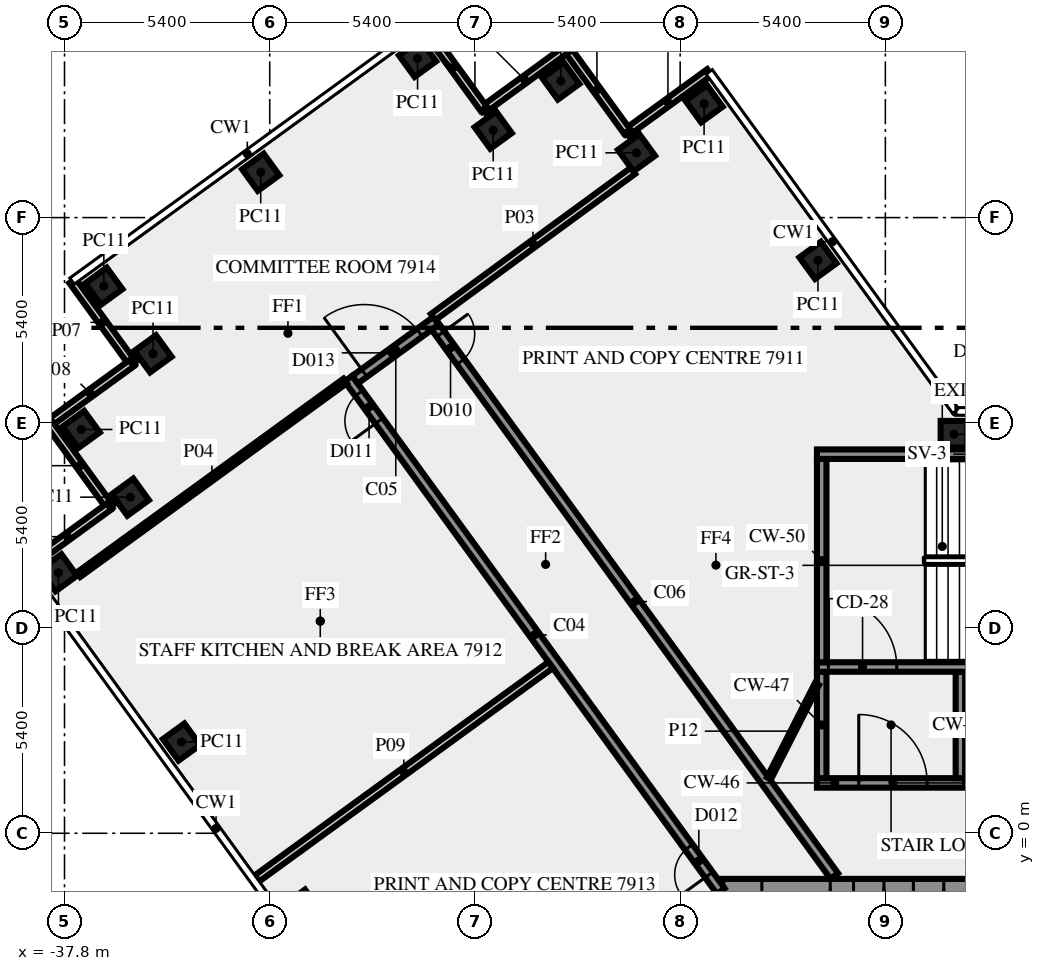
"""IFC4 building model, lengths in metres.
Left out: names, types, materials, properties, quantities, classifications, styles, units other than length and angle.
Written with IfcOpenShell. Run it as: python <this file> out.ifc"""

import sys

from ifc_helpers import new_model, si_unit, direction, frame, frame_2d, origin, origin_2d, place, context, subcontext, project, spatial, rectangle, extrude, element, fill, save


model = new_model("IFC4")
c1 = context("Model", 3, precision=1e-05, world=origin(), true_north=direction((0.0, 1.0)))
c2 = subcontext(c1, "Body", "Model", "MODEL_VIEW")
j1 = project(units=[si_unit("LENGTHUNIT", "METRE"), si_unit("PLANEANGLEUNIT", "RADIAN")], contexts=[c1])
p1 = place(None, origin())
s1 = spatial("IfcSite", under=j1, at=p1, CompositionType="ELEMENT")
p2 = place(p1, origin())
s2 = spatial("IfcBuilding", under=s1, at=p2, CompositionType="ELEMENT")
p3 = place(p2, frame((0.0, 0.0, 339.0)))
s3 = spatial("IfcBuildingStorey", under=s2, at=p3, CompositionType="ELEMENT", Elevation=339.0)
for number, where, z_axis, x_axis in (
    (1, (-17.974, 15.075, 0.0), (0.0, 0.0, 1.0), (-0.588, 0.809, 0.0)),
    (2, (-20.97, 19.195, 0.0), (0.0, 0.0, 1.0), (-0.588, 0.809, 0.0)),
    (3, (-22.749, 17.904, 0.0), (0.0, 0.0, 1.0), (-0.588, 0.809, 0.0)),
    (4, (-24.74, 19.795, 0.0), (0.0, 0.0, 1.0), (-0.588, 0.809, 0.0)),
    (5, (-26.519, 18.5, 0.0), (0.0, 0.0, 1.0), (-0.588, 0.809, 0.0)),
    (6, (-28.51, 20.39, 0.0), (0.0, 0.0, 1.0), (-0.809, -0.588, 0.0)),
    (7, (-32.637, 17.393, 0.0), (0.0, 0.0, 1.0), (-0.809, -0.588, 0.0)),
    (8, (-36.765, 14.395, 0.0), (0.0, 0.0, 1.0), (0.588, -0.809, 0.0)),
    (9, (-35.471, 12.616, 0.0), (0.0, 0.0, 1.0), (-0.809, -0.588, 0.0)),
    (10, (-37.36, 10.625, 0.0), (0.0, 0.0, 1.0), (0.588, -0.809, 0.0)),
    (11, (-36.068, 8.844, 0.0), (0.0, 0.0, 1.0), (0.588, -0.809, 0.0)),
    (12, (-37.96, 6.855, 0.0), (0.0, 0.0, 1.0), (0.588, -0.809, 0.0)),
    (13, (-34.722, 2.4, 0.0), (0.0, 0.0, 1.0), (0.588, -0.809, 0.0)),
    (14, (-31.548, -1.969, 0.0), (0.0, 0.0, 1.0), (0.588, -0.809, 0.0)),
    (15, (-14.395, 10.5, 0.0), (0.0, 0.0, 1.0), (-1.0, 0.0, 0.0)),
):
    element("IfcColumn", number, at=place(p3, frame(where, z_axis=z_axis, x_axis=x_axis)), inside=s3, PredefinedType="COLUMN", context=c2, shape_type="SweptSolid", body=[
        extrude(rectangle(XDim=0.7, YDim=0.7, at=origin_2d()), origin(), (0.0, 0.0, 1.0), 3.65),
    ])
for number, where, z_axis, x_axis in (
    (16, (-20.829, 20.025, 0.0), (0.0, 0.0, 1.0), (-0.809, -0.588, 0.0)),
    (17, (-22.996, 18.466, 0.0), (0.0, 0.0, 1.0), (-0.588, 0.809, 0.0)),
):
    element("IfcWall", number, at=place(p3, frame(where, z_axis=z_axis, x_axis=x_axis)), inside=s3, PredefinedType="SOLIDWALL", context=c2, shape_type="SweptSolid", body=[
        extrude(rectangle(XDim=2.7, YDim=0.2, at=frame_2d((1.35, 0.0))), origin(), (0.0, 0.0, 1.0), 3.65),
    ])
for number, where, z_axis, x_axis in (
    (18, (-24.6, 20.623, 0.0), (0.0, 0.0, 1.0), (-0.809, -0.588, 0.0)),
    (19, (-26.768, 19.063, 0.0), (0.0, 0.0, 1.0), (-0.588, 0.809, 0.0)),
):
    element("IfcWall", number, at=place(p3, frame(where, z_axis=z_axis, x_axis=x_axis)), inside=s3, PredefinedType="SOLIDWALL", context=c2, shape_type="SweptSolid", body=[
        extrude(rectangle(XDim=2.7, YDim=0.2, at=frame_2d((1.35, 0.0))), origin(), (0.0, 0.0, 1.0), 3.65),
    ])
for number, where, z_axis, x_axis in (
    (20, (-37.592, 14.536, 0.0), (0.0, 0.0, 1.0), (0.588, -0.809, 0.0)),
    (21, (-36.032, 12.369, 0.0), (0.0, 0.0, 1.0), (-0.809, -0.588, 0.0)),
    (22, (-38.189, 10.765, 0.0), (0.0, 0.0, 1.0), (0.588, -0.809, 0.0)),
    (23, (-36.629, 8.597, 0.0), (0.0, 0.0, 1.0), (-0.809, -0.588, 0.0)),
):
    element("IfcWall", number, at=place(p3, frame(where, z_axis=z_axis, x_axis=x_axis)), inside=s3, PredefinedType="SOLIDWALL", context=c2, shape_type="SweptSolid", body=[
        extrude(rectangle(XDim=2.7, YDim=0.2, at=frame_2d((1.35, 0.0))), origin(), (0.0, 0.0, 1.0), 3.65),
    ])
p4 = place(p3, frame((20.49, -1.45, 0.0), z_axis=(0.0, 0.0, 1.0), x_axis=(-1.0, 0.0, 0.0)))
e24 = element("IfcWall", 24, at=p4, inside=s3, PredefinedType="SHEAR", context=c2, shape_type="SweptSolid", body=[
    extrude(rectangle(XDim=40.98, YDim=0.5, at=frame_2d((20.49, 0.0))), origin(), (0.0, 0.0, 1.0), 3.65),
])
p5 = place(p4, frame((38.14, 0.0, 0.0)))
e25 = element("IfcOpeningElement", 25, at=p5, cuts=e24, PredefinedType="OPENING", context=c2, shape_type="SweptSolid", body=[
    extrude(rectangle(XDim=1.8, YDim=2.1, at=frame_2d((0.9, 1.05))), frame((0.0, 0.26, 0.0), z_axis=(0.0, -1.0, 0.0), x_axis=(1.0, 0.0, 0.0)), (0.0, 0.0, 1.0), 0.52),
])
p6 = place(p4, frame((36.728, 0.0, 0.0)))
e26 = element("IfcOpeningElement", 26, at=p6, cuts=e24, PredefinedType="OPENING", context=c2, shape_type="SweptSolid", body=[
    extrude(rectangle(XDim=0.8, YDim=2.1, at=frame_2d((0.4, 1.05))), frame((0.0, 0.26, 0.0), z_axis=(0.0, -1.0, 0.0), x_axis=(1.0, 0.0, 0.0)), (0.0, 0.0, 1.0), 0.52),
])
p7 = place(p4, frame((35.153, 0.0, 0.0)))
e27 = element("IfcOpeningElement", 27, at=p7, cuts=e24, PredefinedType="OPENING", context=c2, shape_type="SweptSolid", body=[
    extrude(rectangle(XDim=0.8, YDim=2.1, at=frame_2d((0.4, 1.05))), frame((0.0, 0.26, 0.0), z_axis=(0.0, -1.0, 0.0), x_axis=(1.0, 0.0, 0.0)), (0.0, 0.0, 1.0), 0.52),
])
p8 = place(p4, frame((32.94, 0.0, 0.0)))
e28 = element("IfcOpeningElement", 28, at=p8, cuts=e24, PredefinedType="OPENING", context=c2, shape_type="SweptSolid", body=[
    extrude(rectangle(XDim=0.9, YDim=2.1, at=frame_2d((0.45, 1.05))), frame((0.0, 0.26, 0.0), z_axis=(0.0, -1.0, 0.0), x_axis=(1.0, 0.0, 0.0)), (0.0, 0.0, 1.0), 0.52),
])
p9 = place(p4, frame((31.015, 0.0, 0.0)))
e29 = element("IfcOpeningElement", 29, at=p9, cuts=e24, PredefinedType="OPENING", context=c2, shape_type="SweptSolid", body=[
    extrude(rectangle(XDim=0.8, YDim=2.1, at=frame_2d((0.4, 1.05))), frame((0.0, 0.26, 0.0), z_axis=(0.0, -1.0, 0.0), x_axis=(1.0, 0.0, 0.0)), (0.0, 0.0, 1.0), 0.52),
])
p10 = place(p4, frame((24.765, 0.0, 0.0)))
e30 = element("IfcOpeningElement", 30, at=p10, cuts=e24, PredefinedType="OPENING", context=c2, shape_type="SweptSolid", body=[
    extrude(rectangle(XDim=0.8, YDim=2.1, at=frame_2d((0.4, 1.05))), frame((0.0, 0.26, 0.0), z_axis=(0.0, -1.0, 0.0), x_axis=(1.0, 0.0, 0.0)), (0.0, 0.0, 1.0), 0.52),
])
p11 = place(p4, frame((19.59, 0.0, 0.0)))
e31 = element("IfcOpeningElement", 31, at=p11, cuts=e24, PredefinedType="OPENING", context=c2, shape_type="SweptSolid", body=[
    extrude(rectangle(XDim=2.0, YDim=2.1, at=frame_2d((1.0, 1.05))), frame((0.0, 0.26, 0.0), z_axis=(0.0, -1.0, 0.0), x_axis=(1.0, 0.0, 0.0)), (0.0, 0.0, 1.0), 0.52),
])
p12 = place(p4, frame((15.103, 0.0, 0.0)))
e32 = element("IfcOpeningElement", 32, at=p12, cuts=e24, PredefinedType="OPENING", context=c2, shape_type="SweptSolid", body=[
    extrude(rectangle(XDim=0.9, YDim=2.1, at=frame_2d((0.45, 1.05))), frame((0.0, 0.26, 0.0), z_axis=(0.0, -1.0, 0.0), x_axis=(1.0, 0.0, 0.0)), (0.0, 0.0, 1.0), 0.52),
])
p13 = place(p4, frame((13.04, 0.0, 0.0)))
e33 = element("IfcOpeningElement", 33, at=p13, cuts=e24, PredefinedType="OPENING", context=c2, shape_type="SweptSolid", body=[
    extrude(rectangle(XDim=0.9, YDim=2.1, at=frame_2d((0.45, 1.05))), frame((0.0, 0.26, 0.0), z_axis=(0.0, -1.0, 0.0), x_axis=(1.0, 0.0, 0.0)), (0.0, 0.0, 1.0), 0.52),
])
p14 = place(p4, frame((10.177, 0.0, 0.0)))
e34 = element("IfcOpeningElement", 34, at=p14, cuts=e24, PredefinedType="OPENING", context=c2, shape_type="SweptSolid", body=[
    extrude(rectangle(XDim=0.9, YDim=2.1, at=frame_2d((0.45, 1.05))), frame((0.0, 0.26, 0.0), z_axis=(0.0, -1.0, 0.0), x_axis=(1.0, 0.0, 0.0)), (0.0, 0.0, 1.0), 0.52),
])
p15 = place(p4, frame((7.14, 0.0, 0.0)))
e35 = element("IfcOpeningElement", 35, at=p15, cuts=e24, PredefinedType="OPENING", context=c2, shape_type="SweptSolid", body=[
    extrude(rectangle(XDim=0.9, YDim=2.1, at=frame_2d((0.45, 1.05))), frame((0.0, 0.26, 0.0), z_axis=(0.0, -1.0, 0.0), x_axis=(1.0, 0.0, 0.0)), (0.0, 0.0, 1.0), 0.52),
])
p16 = place(p4, frame((4.19, 0.0, 0.0)))
e36 = element("IfcOpeningElement", 36, at=p16, cuts=e24, PredefinedType="OPENING", context=c2, shape_type="SweptSolid", body=[
    extrude(rectangle(XDim=0.9, YDim=2.1, at=frame_2d((0.45, 1.05))), frame((0.0, 0.26, 0.0), z_axis=(0.0, -1.0, 0.0), x_axis=(1.0, 0.0, 0.0)), (0.0, 0.0, 1.0), 0.52),
])
p17 = place(p4, frame((1.04, 0.0, 0.0)))
e37 = element("IfcOpeningElement", 37, at=p17, cuts=e24, PredefinedType="OPENING", context=c2, shape_type="SweptSolid", body=[
    extrude(rectangle(XDim=1.8, YDim=2.1, at=frame_2d((0.9, 1.05))), frame((0.0, 0.26, 0.0), z_axis=(0.0, -1.0, 0.0), x_axis=(1.0, 0.0, 0.0)), (0.0, 0.0, 1.0), 0.52),
])
p18 = place(p3, frame((-18.0, 1.325, 0.0), z_axis=(0.0, 0.0, 1.0), x_axis=(1.0, 0.0, 0.0)))
e38 = element("IfcWall", 38, at=p18, inside=s3, PredefinedType="SHEAR", context=c2, shape_type="SweptSolid", body=[
    extrude(rectangle(XDim=3.9, YDim=0.25, at=frame_2d((1.95, 0.0))), origin(), (0.0, 0.0, 1.0), 3.65),
])
p19 = place(p18, frame((1.1, 0.0, 0.0)))
e39 = element("IfcOpeningElement", 39, at=p19, cuts=e38, PredefinedType="OPENING", context=c2, shape_type="SweptSolid", body=[
    extrude(rectangle(XDim=1.8, YDim=2.1, at=frame_2d((0.9, 1.05))), frame((0.0, 0.135, 0.0), z_axis=(0.0, -1.0, 0.0), x_axis=(1.0, 0.0, 0.0)), (0.0, 0.0, 1.0), 0.27),
])
for number, where, z_axis, x_axis in (
    (40, (-17.875, 1.45, 0.0), (0.0, 0.0, 1.0), (0.0, 1.0, 0.0)),
    (41, (-14.225, 1.45, 0.0), (0.0, 0.0, 1.0), (0.0, 1.0, 0.0)),
):
    element("IfcWall", number, at=place(p3, frame(where, z_axis=z_axis, x_axis=x_axis)), inside=s3, PredefinedType="SHEAR", context=c2, shape_type="SweptSolid", body=[
        extrude(rectangle(XDim=2.8, YDim=0.25, at=frame_2d((1.4, 0.0))), origin(), (0.0, 0.0, 1.0), 3.65),
    ])
p20 = place(p3, frame((-18.0, 4.375, 0.0), z_axis=(0.0, 0.0, 1.0), x_axis=(1.0, 0.0, 0.0)))
e42 = element("IfcWall", 42, at=p20, inside=s3, PredefinedType="SHEAR", context=c2, shape_type="SweptSolid", body=[
    extrude(rectangle(XDim=10.5, YDim=0.25, at=frame_2d((5.25, 0.0))), origin(), (0.0, 0.0, 1.0), 3.65),
])
p21 = place(p20, frame((0.3, 0.0, 0.0)))
e43 = element("IfcOpeningElement", 43, at=p21, cuts=e42, PredefinedType="OPENING", context=c2, shape_type="SweptSolid", body=[
    extrude(rectangle(XDim=1.8, YDim=2.1, at=frame_2d((0.9, 1.05))), frame((0.0, 0.135, 0.0), z_axis=(0.0, -1.0, 0.0), x_axis=(1.0, 0.0, 0.0)), (0.0, 0.0, 1.0), 0.27),
])
p22 = place(p3, frame((-17.875, 4.5, 0.0), z_axis=(0.0, 0.0, 1.0), x_axis=(0.0, 1.0, 0.0)))
e44 = element("IfcWall", 44, at=p22, inside=s3, PredefinedType="SHEAR", context=c2, shape_type="SweptSolid", body=[
    extrude(rectangle(XDim=5.35, YDim=0.25, at=frame_2d((2.675, 0.0))), origin(), (0.0, 0.0, 1.0), 3.65),
])
p23 = place(p3, frame((-18.0, 9.975, 0.0), z_axis=(0.0, 0.0, 1.0), x_axis=(1.0, 0.0, 0.0)))
e45 = element("IfcWall", 45, at=p23, inside=s3, PredefinedType="SHEAR", context=c2, shape_type="SweptSolid", body=[
    extrude(rectangle(XDim=10.5, YDim=0.25, at=frame_2d((5.25, 0.0))), origin(), (0.0, 0.0, 1.0), 3.65),
])
p24 = place(p23, frame((4.5, 0.0, 1.0)))
e46 = element("IfcOpeningElement", 46, at=p24, cuts=e45, PredefinedType="OPENING", context=c2, shape_type="SweptSolid", body=[
    extrude(rectangle(XDim=1.2, YDim=1.2, at=frame_2d((0.6, 0.6))), frame((0.0, 0.135, 0.0), z_axis=(0.0, -1.0, 0.0), x_axis=(1.0, 0.0, 0.0)), (0.0, 0.0, 1.0), 0.27),
])
p25 = place(p3, frame((-20.531, -1.523, 0.0), z_axis=(0.0, 0.0, 1.0), x_axis=(-0.587785867777, 0.809016547199, 0.0)))
e47 = element("IfcWall", 47, at=p25, inside=s3, PredefinedType="SOLIDWALL", context=c2, shape_type="SweptSolid", body=[
    extrude(rectangle(XDim=16.67, YDim=0.25, at=frame_2d((8.335, 0.0))), origin(), (0.0, 0.0, 1.0), 3.65),
])
p26 = place(p25, frame((0.533, 0.0, 0.0)))
e48 = element("IfcOpeningElement", 48, at=p26, cuts=e47, PredefinedType="OPENING", context=c2, shape_type="SweptSolid", body=[
    extrude(rectangle(XDim=0.9, YDim=2.1, at=frame_2d((0.45, 1.05))), frame((0.0, 0.135, 0.0), z_axis=(0.0, -1.0, 0.0), x_axis=(1.0, 0.0, 0.0)), (0.0, 0.0, 1.0), 0.27),
])
p27 = place(p25, frame((15.296, 0.0, 0.0)))
e49 = element("IfcOpeningElement", 49, at=p27, cuts=e47, PredefinedType="OPENING", context=c2, shape_type="SweptSolid", body=[
    extrude(rectangle(XDim=0.9, YDim=2.1, at=frame_2d((0.45, 1.05))), frame((0.0, 0.135, 0.0), z_axis=(0.0, -1.0, 0.0), x_axis=(1.0, 0.0, 0.0)), (0.0, 0.0, 1.0), 0.27),
])
p28 = place(p3, frame((-30.155, 11.936, 0.0), z_axis=(0.0, 0.0, 1.0), x_axis=(0.809038743598, 0.587755315891, 0.0)))
e50 = element("IfcWall", 50, at=p28, inside=s3, PredefinedType="SOLIDWALL", context=c2, shape_type="SweptSolid", body=[
    extrude(rectangle(XDim=2.65, YDim=0.25, at=frame_2d((1.325, 0.0))), origin(), (0.0, 0.0, 1.0), 3.65),
])
p29 = place(p28, frame((0.3, 0.0, 0.0)))
e51 = element("IfcOpeningElement", 51, at=p29, cuts=e50, PredefinedType="OPENING", context=c2, shape_type="SweptSolid", body=[
    extrude(rectangle(XDim=1.8, YDim=2.1, at=frame_2d((0.9, 1.05))), frame((0.0, 0.135, 0.0), z_axis=(0.0, -1.0, 0.0), x_axis=(1.0, 0.0, 0.0)), (0.0, 0.0, 1.0), 0.27),
])
p30 = place(p3, frame((-28.039, 13.319, 0.0), z_axis=(0.0, 0.0, 1.0), x_axis=(0.587791911753, -0.809012155952, 0.0)))
e52 = element("IfcWall", 52, at=p30, inside=s3, PredefinedType="SOLIDWALL", context=c2, shape_type="SweptSolid", body=[
    extrude(rectangle(XDim=17.853, YDim=0.25, at=frame_2d((8.927, 0.0))), origin(), (0.0, 0.0, 1.0), 3.65),
])
p31 = place(p30, frame((0.225, 0.0, 0.0)))
e53 = element("IfcOpeningElement", 53, at=p31, cuts=e52, PredefinedType="OPENING", context=c2, shape_type="SweptSolid", body=[
    extrude(rectangle(XDim=0.9, YDim=2.1, at=frame_2d((0.45, 1.05))), frame((0.0, 0.135, 0.0), z_axis=(0.0, -1.0, 0.0), x_axis=(1.0, 0.0, 0.0)), (0.0, 0.0, 1.0), 0.27),
])
p32 = place(p3, frame((-28.101, 13.583, 0.0), z_axis=(0.0, 0.0, 1.0), x_axis=(0.80699548015, 0.590557613631, 0.0)))
e54 = element("IfcWall", 54, at=p32, inside=s3, PredefinedType="SOLIDWALL", context=c2, shape_type="SweptSolid", body=[
    extrude(rectangle(XDim=6.515, YDim=0.2, at=frame_2d((3.258, 0.0))), origin(), (0.0, 0.0, 1.0), 3.65),
])
p33 = place(p3, frame((-37.429, 6.805, 0.0), z_axis=(0.0, 0.0, 1.0), x_axis=(0.809020922653, 0.587779845444, 0.0)))
e55 = element("IfcWall", 55, at=p33, inside=s3, PredefinedType="PARTITIONING", context=c2, shape_type="SweptSolid", body=[
    extrude(rectangle(XDim=8.67, YDim=0.15, at=frame_2d((4.335, 0.0))), origin(), (0.0, 0.0, 1.0), 3.65),
])
p34 = place(p3, frame((-25.008, 4.427, 0.0), z_axis=(0.0, 0.0, 1.0), x_axis=(-0.808994684961, -0.587815957341, 0.0)))
e56 = element("IfcWall", 56, at=p34, inside=s3, PredefinedType="SOLIDWALL", context=c2, shape_type="SweptSolid", body=[
    extrude(rectangle(XDim=9.55, YDim=0.2, at=frame_2d((4.775, 0.0))), origin(), (0.0, 0.0, 1.0), 2.95),
])
p35 = place(p3, frame((-19.261, 1.45, 0.0), z_axis=(0.0, 0.0, 1.0), x_axis=(0.453950796792, 0.891026752736, 0.0)))
e57 = element("IfcWall", 57, at=p35, inside=s3, PredefinedType="PARTITIONING", context=c2, shape_type="SweptSolid", body=[
    extrude(rectangle(XDim=2.778, YDim=0.12, at=frame_2d((1.389, 0.0))), origin(), (0.0, 0.0, 1.0), 3.65),
])
p36 = place(p5, origin())
e58 = element("IfcDoor", 58, at=p36, inside=s3, OperationType="DOUBLE_DOOR_SINGLE_SWING", PredefinedType="DOOR", context=c2, shape_type="SweptSolid", body=[
    extrude(rectangle(XDim=1.8, YDim=2.1, at=frame_2d((0.9, 1.05))), frame((0.0, 0.025, 0.0), z_axis=(0.0, -1.0, 0.0), x_axis=(1.0, 0.0, 0.0)), (0.0, 0.0, 1.0), 0.05),
])
fill(e25, e58)
p37 = place(p6, origin())
e59 = element("IfcDoor", 59, at=p37, inside=s3, OperationType="SINGLE_SWING_RIGHT", PredefinedType="DOOR", context=c2, shape_type="SweptSolid", body=[
    extrude(rectangle(XDim=0.8, YDim=2.1, at=frame_2d((0.4, 1.05))), frame((0.0, 0.025, 0.0), z_axis=(0.0, -1.0, 0.0), x_axis=(1.0, 0.0, 0.0)), (0.0, 0.0, 1.0), 0.05),
])
fill(e26, e59)
p38 = place(p7, origin())
e60 = element("IfcDoor", 60, at=p38, inside=s3, OperationType="SINGLE_SWING_RIGHT", PredefinedType="DOOR", context=c2, shape_type="SweptSolid", body=[
    extrude(rectangle(XDim=0.8, YDim=2.1, at=frame_2d((0.4, 1.05))), frame((0.0, 0.025, 0.0), z_axis=(0.0, -1.0, 0.0), x_axis=(1.0, 0.0, 0.0)), (0.0, 0.0, 1.0), 0.05),
])
fill(e27, e60)
p39 = place(p19, origin())
e61 = element("IfcDoor", 61, at=p39, inside=s3, OperationType="DOUBLE_DOOR_SINGLE_SWING", PredefinedType="DOOR", context=c2, shape_type="SweptSolid", body=[
    extrude(rectangle(XDim=1.8, YDim=2.1, at=frame_2d((0.9, 1.05))), frame((0.0, 0.025, 0.0), z_axis=(0.0, -1.0, 0.0), x_axis=(1.0, 0.0, 0.0)), (0.0, 0.0, 1.0), 0.05),
])
fill(e39, e61)
p40 = place(p21, origin())
e62 = element("IfcDoor", 62, at=p40, inside=s3, OperationType="DOUBLE_DOOR_SINGLE_SWING", PredefinedType="DOOR", context=c2, shape_type="SweptSolid", body=[
    extrude(rectangle(XDim=1.8, YDim=2.1, at=frame_2d((0.9, 1.05))), frame((0.0, 0.025, 0.0), z_axis=(0.0, -1.0, 0.0), x_axis=(1.0, 0.0, 0.0)), (0.0, 0.0, 1.0), 0.05),
])
fill(e43, e62)
p41 = place(p29, origin())
e63 = element("IfcDoor", 63, at=p41, inside=s3, OperationType="DOUBLE_DOOR_SINGLE_SWING", PredefinedType="DOOR", context=c2, shape_type="SweptSolid", body=[
    extrude(rectangle(XDim=1.8, YDim=2.1, at=frame_2d((0.9, 1.05))), frame((0.0, 0.025, 0.0), z_axis=(0.0, -1.0, 0.0), x_axis=(1.0, 0.0, 0.0)), (0.0, 0.0, 1.0), 0.05),
])
fill(e51, e63)
p42 = place(p31, origin())
e64 = element("IfcDoor", 64, at=p42, inside=s3, OperationType="SINGLE_SWING_LEFT", PredefinedType="DOOR", context=c2, shape_type="SweptSolid", body=[
    extrude(rectangle(XDim=0.9, YDim=2.1, at=frame_2d((0.45, 1.05))), frame((0.0, 0.025, 0.0), z_axis=(0.0, -1.0, 0.0), x_axis=(1.0, 0.0, 0.0)), (0.0, 0.0, 1.0), 0.05),
])
fill(e53, e64)
p43 = place(p26, origin())
e65 = element("IfcDoor", 65, at=p43, inside=s3, OperationType="SINGLE_SWING_LEFT", PredefinedType="DOOR", context=c2, shape_type="SweptSolid", body=[
    extrude(rectangle(XDim=0.9, YDim=2.1, at=frame_2d((0.45, 1.05))), frame((0.0, 0.025, 0.0), z_axis=(0.0, -1.0, 0.0), x_axis=(1.0, 0.0, 0.0)), (0.0, 0.0, 1.0), 0.05),
])
fill(e48, e65)
p44 = place(p27, origin())
e66 = element("IfcDoor", 66, at=p44, inside=s3, OperationType="SINGLE_SWING_RIGHT", PredefinedType="DOOR", context=c2, shape_type="SweptSolid", body=[
    extrude(rectangle(XDim=0.9, YDim=2.1, at=frame_2d((0.45, 1.05))), frame((0.0, 0.025, 0.0), z_axis=(0.0, -1.0, 0.0), x_axis=(1.0, 0.0, 0.0)), (0.0, 0.0, 1.0), 0.05),
])
fill(e49, e66)
save(model, sys.argv[1])
